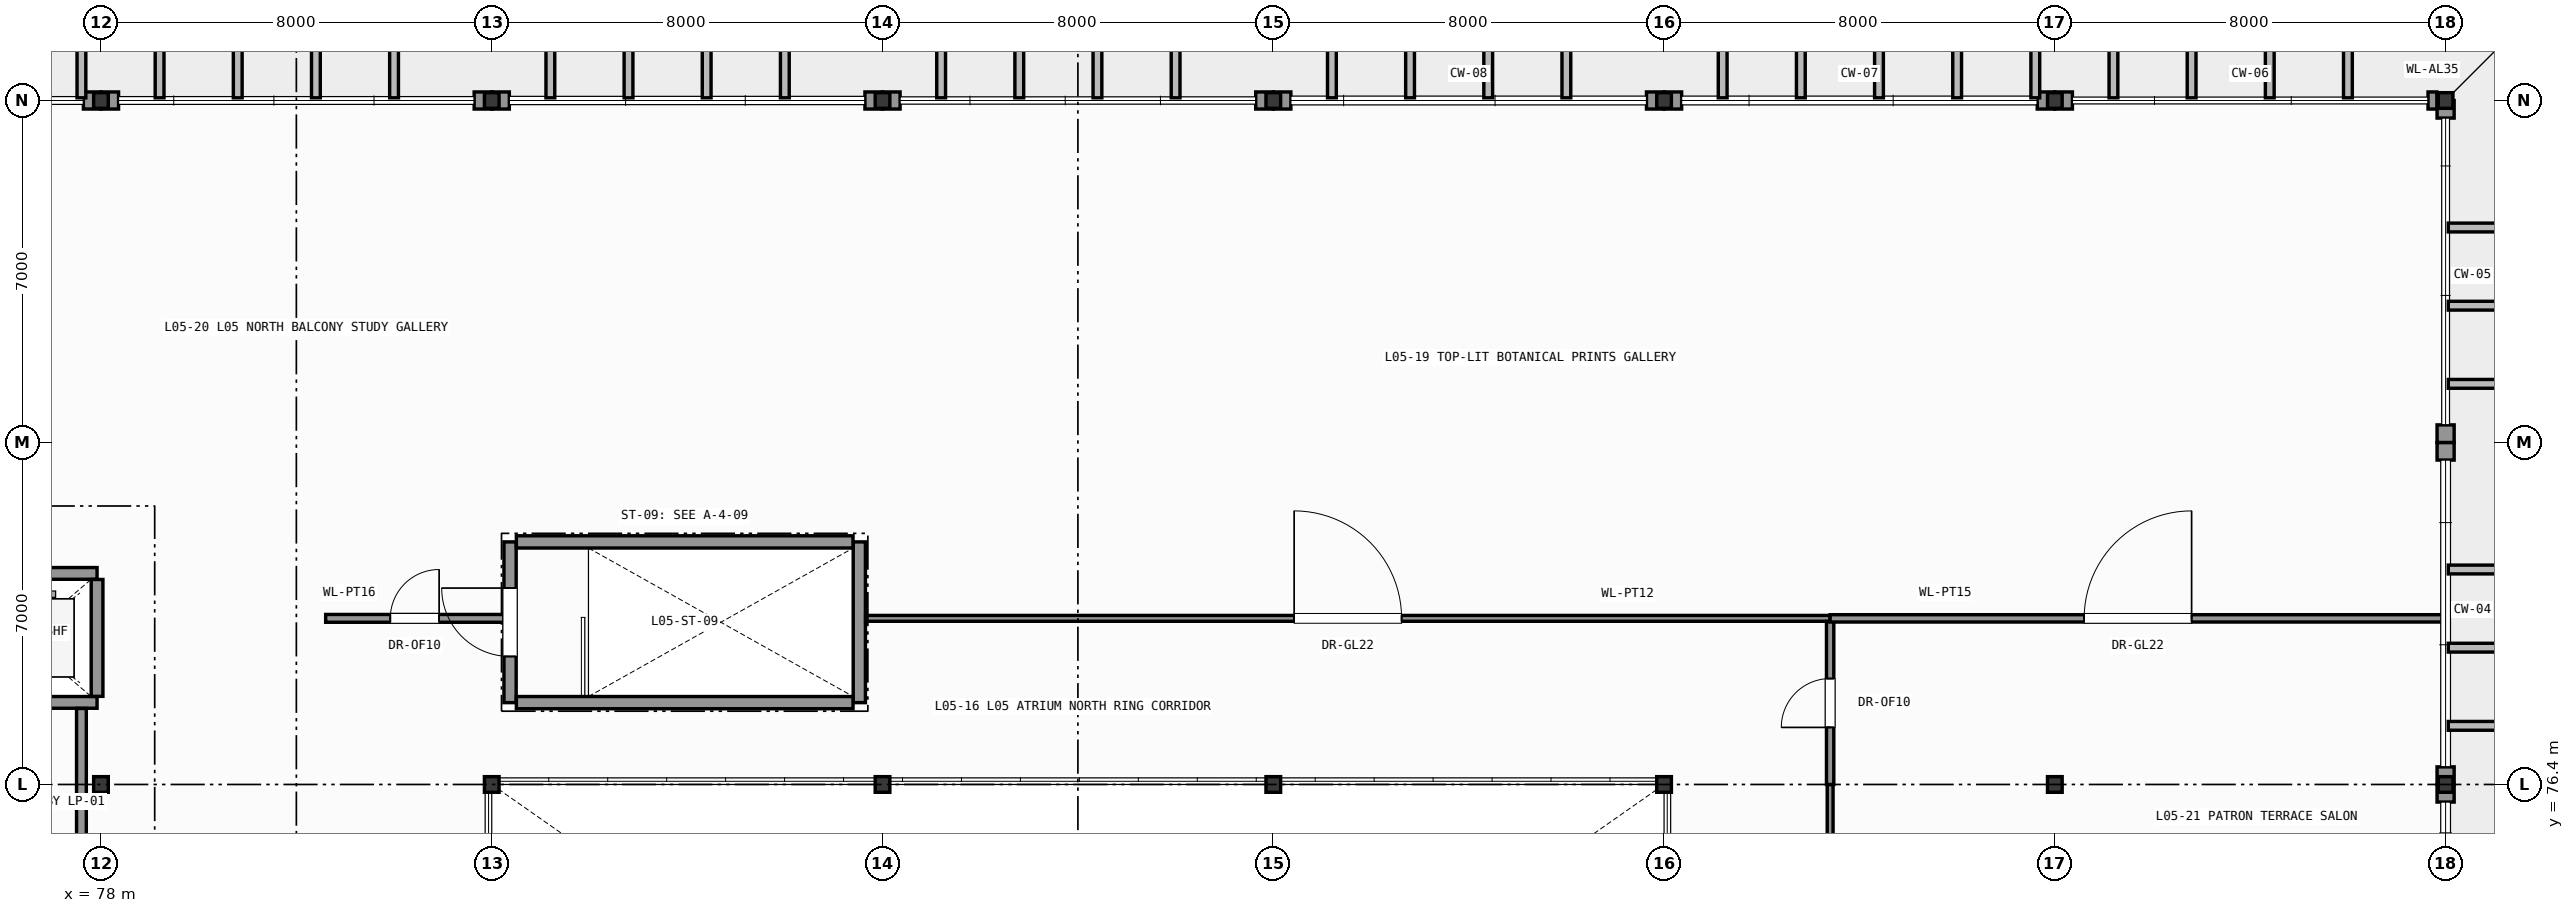
"""IFC4 building model, lengths in metres.
Left out: names, types, materials, properties, quantities, classifications, styles, units other than length and angle.
Written with IfcOpenShell. Run it as: python <this file> out.ifc"""

import sys

from ifc_helpers import new_model, si_unit, direction, frame, frame_2d, origin, origin_2d, place, context, subcontext, project, spatial, rectangle, i_section, extrude, element, fill, save


model = new_model("IFC4")
c1 = context("Model", 3, precision=1e-05, world=origin(), true_north=direction((0.0, 1.0)))
c2 = subcontext(c1, "Body", "Model", "MODEL_VIEW")
j1 = project(units=[si_unit("LENGTHUNIT", "METRE"), si_unit("PLANEANGLEUNIT", "RADIAN")], contexts=[c1])
p1 = place(None, origin())
s1 = spatial("IfcSite", under=j1, at=p1, CompositionType="ELEMENT")
p2 = place(p1, origin())
s2 = spatial("IfcBuilding", under=s1, at=p2, CompositionType="ELEMENT")
p3 = place(p2, frame((0.0, 0.0, 22.2)))
s3 = spatial("IfcBuildingStorey", under=s2, at=p3, CompositionType="ELEMENT", Elevation=22.2)
for number, where, z_axis, x_axis in (
    (1, (78.0, 76.4, 0.0), (0.0, 0.0, 1.0), (1.0, 0.0, 0.0)),
    (2, (78.0, 90.4, 0.0), (0.0, 0.0, 1.0), (1.0, 0.0, 0.0)),
    (3, (86.0, 76.4, 0.0), (0.0, 0.0, 1.0), (1.0, 0.0, 0.0)),
    (4, (86.0, 90.4, 0.0), (0.0, 0.0, 1.0), (1.0, 0.0, 0.0)),
    (5, (94.0, 76.4, 0.0), (0.0, 0.0, 1.0), (1.0, 0.0, 0.0)),
    (6, (94.0, 90.4, 0.0), (0.0, 0.0, 1.0), (1.0, 0.0, 0.0)),
    (7, (102.0, 76.4, 0.0), (0.0, 0.0, 1.0), (1.0, 0.0, 0.0)),
    (8, (102.0, 90.4, 0.0), (0.0, 0.0, 1.0), (1.0, 0.0, 0.0)),
    (9, (110.0, 76.4, 0.0), (0.0, 0.0, 1.0), (1.0, 0.0, 0.0)),
    (10, (110.0, 90.4, 0.0), (0.0, 0.0, 1.0), (1.0, 0.0, 0.0)),
    (11, (118.0, 76.4, 0.0), (0.0, 0.0, 1.0), (1.0, 0.0, 0.0)),
    (12, (118.0, 90.4, 0.0), (0.0, 0.0, 1.0), (1.0, 0.0, 0.0)),
    (13, (126.0, 76.4, 0.0), (0.0, 0.0, 1.0), (1.0, 0.0, 0.0)),
    (14, (126.0, 90.4, 0.0), (0.0, 0.0, 1.0), (1.0, 0.0, 0.0)),
):
    element("IfcColumn", number, at=place(p3, frame(where, z_axis=z_axis, x_axis=x_axis)), inside=s3, PredefinedType="COLUMN", context=c2, shape_type="SweptSolid", body=[
        extrude(i_section(OverallWidth=0.3, OverallDepth=0.32, WebThickness=0.011, FlangeThickness=0.021, FilletRadius=0.027, at=origin_2d()), origin(), (0.0, 0.0, 1.0), 4.2),
    ])
p4 = place(p3, frame((126.0, 76.04, 0.0), z_axis=(0.0, 0.0, 1.0), x_axis=(0.0, 1.0, 0.0)))
e15 = element("IfcWall", 15, at=p4, inside=s3, PredefinedType="SOLIDWALL", context=c2, shape_type="SweptSolid", body=[
    extrude(rectangle(XDim=0.36, YDim=0.35, at=frame_2d((0.18, 0.0))), origin(), (0.0, 0.0, 1.0), 3.98),
])
p5 = place(p3, frame((126.0, 76.4, 0.0), z_axis=(0.0, 0.0, 1.0), x_axis=(0.0, 1.0, 0.0)))
e16 = element("IfcWall", 16, at=p5, inside=s3, PredefinedType="SOLIDWALL", context=c2, shape_type="SweptSolid", body=[
    extrude(rectangle(XDim=0.36, YDim=0.35, at=frame_2d((0.18, 0.0))), origin(), (0.0, 0.0, 1.0), 3.98),
])
p6 = place(p3, frame((126.0, 83.04, 0.0), z_axis=(0.0, 0.0, 1.0), x_axis=(0.0, 1.0, 0.0)))
e17 = element("IfcWall", 17, at=p6, inside=s3, PredefinedType="SOLIDWALL", context=c2, shape_type="SweptSolid", body=[
    extrude(rectangle(XDim=0.36, YDim=0.35, at=frame_2d((0.18, 0.0))), origin(), (0.0, 0.0, 1.0), 3.98),
])
p7 = place(p3, frame((126.0, 83.4, 0.0), z_axis=(0.0, 0.0, 1.0), x_axis=(0.0, 1.0, 0.0)))
e18 = element("IfcWall", 18, at=p7, inside=s3, PredefinedType="SOLIDWALL", context=c2, shape_type="SweptSolid", body=[
    extrude(rectangle(XDim=0.36, YDim=0.35, at=frame_2d((0.18, 0.0))), origin(), (0.0, 0.0, 1.0), 3.98),
])
p8 = place(p3, frame((126.0, 90.04, 0.0), z_axis=(0.0, 0.0, 1.0), x_axis=(0.0, 1.0, 0.0)))
e19 = element("IfcWall", 19, at=p8, inside=s3, PredefinedType="SOLIDWALL", context=c2, shape_type="SweptSolid", body=[
    extrude(rectangle(XDim=0.36, YDim=0.35, at=frame_2d((0.18, 0.0))), origin(), (0.0, 0.0, 1.0), 3.98),
])
p9 = place(p3, frame((125.821, 90.4, 0.0), z_axis=(0.0, 0.0, 1.0), x_axis=(-1.0, 0.0, 0.0)))
e20 = element("IfcWall", 20, at=p9, inside=s3, PredefinedType="SOLIDWALL", context=c2, shape_type="SweptSolid", body=[
    extrude(rectangle(XDim=0.181, YDim=0.35, at=frame_2d((0.091, 0.0))), origin(), (0.0, 0.0, 1.0), 3.98),
])
for number, where, z_axis, x_axis in (
    (21, (118.36, 90.4, 0.0), (0.0, 0.0, 1.0), (-1.0, 0.0, 0.0)),
    (22, (118.0, 90.4, 0.0), (0.0, 0.0, 1.0), (-1.0, 0.0, 0.0)),
    (23, (110.36, 90.4, 0.0), (0.0, 0.0, 1.0), (-1.0, 0.0, 0.0)),
    (24, (110.0, 90.4, 0.0), (0.0, 0.0, 1.0), (-1.0, 0.0, 0.0)),
    (25, (102.36, 90.4, 0.0), (0.0, 0.0, 1.0), (-1.0, 0.0, 0.0)),
    (26, (102.0, 90.4, 0.0), (0.0, 0.0, 1.0), (-1.0, 0.0, 0.0)),
    (27, (94.36, 90.4, 0.0), (0.0, 0.0, 1.0), (-1.0, 0.0, 0.0)),
    (28, (94.0, 90.4, 0.0), (0.0, 0.0, 1.0), (-1.0, 0.0, 0.0)),
    (29, (86.36, 90.4, 0.0), (0.0, 0.0, 1.0), (-1.0, 0.0, 0.0)),
    (30, (86.0, 90.4, 0.0), (0.0, 0.0, 1.0), (-1.0, 0.0, 0.0)),
    (31, (78.36, 90.4, 0.0), (0.0, 0.0, 1.0), (-1.0, 0.0, 0.0)),
    (32, (78.0, 90.4, 0.0), (0.0, 0.0, 1.0), (-1.0, 0.0, 0.0)),
):
    element("IfcWall", number, at=place(p3, frame(where, z_axis=z_axis, x_axis=x_axis)), inside=s3, PredefinedType="SOLIDWALL", context=c2, shape_type="SweptSolid", body=[
        extrude(rectangle(XDim=0.36, YDim=0.35, at=frame_2d((0.18, 0.0))), origin(), (0.0, 0.0, 1.0), 3.335),
    ])
p10 = place(p3, frame((86.375, 78.075, 0.0), z_axis=(0.0, 0.0, 1.0), x_axis=(0.0, 1.0, 0.0)))
e33 = element("IfcWall", 33, at=p10, inside=s3, PredefinedType="SHEAR", context=c2, shape_type="SweptSolid", body=[
    extrude(rectangle(XDim=3.29, YDim=0.25, at=frame_2d((1.645, 0.0))), origin(), (0.0, 0.0, 1.0), 3.98),
])
p11 = place(p10, frame((0.945, 0.0, 0.0)))
e34 = element("IfcOpeningElement", 34, at=p11, cuts=e33, PredefinedType="OPENING", context=c2, shape_type="SweptSolid", body=[
    extrude(rectangle(XDim=1.4, YDim=2.2, at=frame_2d((0.7, 1.1))), frame((0.0, 0.135, 0.0), z_axis=(0.0, -1.0, 0.0), x_axis=(1.0, 0.0, 0.0)), (0.0, 0.0, 1.0), 0.27),
])
p12 = place(p3, frame((93.525, 78.075, 0.0), z_axis=(0.0, 0.0, 1.0), x_axis=(0.0, 1.0, 0.0)))
e35 = element("IfcWall", 35, at=p12, inside=s3, PredefinedType="SHEAR", context=c2, shape_type="SweptSolid", body=[
    extrude(rectangle(XDim=3.29, YDim=0.25, at=frame_2d((1.645, 0.0))), origin(), (0.0, 0.0, 1.0), 3.98),
])
for number, where, z_axis, x_axis in (
    (36, (86.504, 78.075, 0.0), (0.0, 0.0, 1.0), (1.0, 0.0, 0.0)),
    (37, (86.504, 81.365, 0.0), (0.0, 0.0, 1.0), (1.0, 0.0, 0.0)),
):
    element("IfcWall", number, at=place(p3, frame(where, z_axis=z_axis, x_axis=x_axis)), inside=s3, PredefinedType="SHEAR", context=c2, shape_type="SweptSolid", body=[
        extrude(rectangle(XDim=6.892, YDim=0.25, at=frame_2d((3.446, 0.0))), origin(), (0.0, 0.0, 1.0), 3.98),
    ])
p13 = place(p3, frame((74.88, 78.08, 0.0), z_axis=(0.0, 0.0, 1.0), x_axis=(1.0, 0.0, 0.0)))
e38 = element("IfcWall", 38, at=p13, inside=s3, PredefinedType="SHEAR", context=c2, shape_type="SweptSolid", body=[
    extrude(rectangle(XDim=3.04, YDim=0.24, at=frame_2d((1.52, 0.0))), origin(), (0.0, 0.0, 1.0), 3.98),
])
p14 = place(p13, frame((0.97, 0.0, 0.0)))
e39 = element("IfcOpeningElement", 39, at=p14, cuts=e38, PredefinedType="OPENING", context=c2, shape_type="SweptSolid", body=[
    extrude(rectangle(XDim=1.1, YDim=2.2, at=frame_2d((0.55, 1.1))), frame((0.0, 0.13, 0.0), z_axis=(0.0, -1.0, 0.0), x_axis=(1.0, 0.0, 0.0)), (0.0, 0.0, 1.0), 0.26),
])
p15 = place(p3, frame((74.88, 80.72, 0.0), z_axis=(0.0, 0.0, 1.0), x_axis=(1.0, 0.0, 0.0)))
e40 = element("IfcWall", 40, at=p15, inside=s3, PredefinedType="SHEAR", context=c2, shape_type="SweptSolid", body=[
    extrude(rectangle(XDim=3.04, YDim=0.24, at=frame_2d((1.52, 0.0))), origin(), (0.0, 0.0, 1.0), 3.98),
])
p16 = place(p3, frame((77.92, 78.204, 0.0), z_axis=(0.0, 0.0, 1.0), x_axis=(0.0, 1.0, 0.0)))
e41 = element("IfcWall", 41, at=p16, inside=s3, PredefinedType="SHEAR", context=c2, shape_type="SweptSolid", body=[
    extrude(rectangle(XDim=2.392, YDim=0.24, at=frame_2d((1.196, 0.0))), origin(), (0.0, 0.0, 1.0), 3.98),
])
p17 = place(p3, frame((77.6, 74.304, 0.0), z_axis=(0.0, 0.0, 1.0), x_axis=(0.0, 1.0, 0.0)))
e42 = element("IfcWall", 42, at=p17, inside=s3, PredefinedType="PARTITIONING", context=c2, shape_type="SweptSolid", body=[
    extrude(rectangle(XDim=3.652, YDim=0.2, at=frame_2d((1.826, 0.0))), origin(), (0.0, 0.0, 1.0), 3.98),
])
p18 = place(p3, frame((113.4, 71.6, 0.0), z_axis=(0.0, 0.0, 1.0), x_axis=(0.0, 1.0, 0.0)))
e43 = element("IfcWall", 43, at=p18, inside=s3, PredefinedType="PARTITIONING", context=c2, shape_type="SweptSolid", body=[
    extrude(rectangle(XDim=4.8, YDim=0.12, at=frame_2d((2.4, 0.0))), origin(), (0.0, 0.0, 1.0), 3.98),
])
p19 = place(p18, frame((1.5, 0.0, 0.0)))
e44 = element("IfcOpeningElement", 44, at=p19, cuts=e43, PredefinedType="OPENING", context=c2, shape_type="SweptSolid", body=[
    extrude(rectangle(XDim=1.8, YDim=2.4, at=frame_2d((0.9, 1.2))), frame((0.0, 0.07, 0.0), z_axis=(0.0, -1.0, 0.0), x_axis=(1.0, 0.0, 0.0)), (0.0, 0.0, 1.0), 0.14),
])
p20 = place(p3, frame((93.654, 79.8, 0.0), z_axis=(0.0, 0.0, 1.0), x_axis=(1.0, 0.0, 0.0)))
e45 = element("IfcWall", 45, at=p20, inside=s3, PredefinedType="PARTITIONING", context=c2, shape_type="SweptSolid", body=[
    extrude(rectangle(XDim=19.746, YDim=0.12, at=frame_2d((9.873, 0.0))), origin(), (0.0, 0.0, 1.0), 3.98),
])
p21 = place(p20, frame((8.773, 0.0, 0.0)))
e46 = element("IfcOpeningElement", 46, at=p21, cuts=e45, PredefinedType="OPENING", context=c2, shape_type="SweptSolid", body=[
    extrude(rectangle(XDim=2.2, YDim=2.6, at=frame_2d((1.1, 1.3))), frame((0.0, 0.07, 0.0), z_axis=(0.0, -1.0, 0.0), x_axis=(1.0, 0.0, 0.0)), (0.0, 0.0, 1.0), 0.14),
])
p22 = place(p3, frame((82.6, 79.8, 0.0), z_axis=(0.0, 0.0, 1.0), x_axis=(1.0, 0.0, 0.0)))
e47 = element("IfcWall", 47, at=p22, inside=s3, PredefinedType="PARTITIONING", context=c2, shape_type="SweptSolid", body=[
    extrude(rectangle(XDim=3.646, YDim=0.16, at=frame_2d((1.823, 0.0))), origin(), (0.0, 0.0, 1.0), 3.98),
])
p23 = place(p22, frame((1.323, 0.0, 0.0)))
e48 = element("IfcOpeningElement", 48, at=p23, cuts=e47, PredefinedType="OPENING", context=c2, shape_type="SweptSolid", body=[
    extrude(rectangle(XDim=1.0, YDim=2.15, at=frame_2d((0.5, 1.075))), frame((0.0, 0.09, 0.0), z_axis=(0.0, -1.0, 0.0), x_axis=(1.0, 0.0, 0.0)), (0.0, 0.0, 1.0), 0.18),
])
p24 = place(p3, frame((113.4, 76.4, 0.0), z_axis=(0.0, 0.0, 1.0), x_axis=(0.0, 1.0, 0.0)))
e49 = element("IfcWall", 49, at=p24, inside=s3, PredefinedType="PARTITIONING", context=c2, shape_type="SweptSolid", body=[
    extrude(rectangle(XDim=3.336, YDim=0.15, at=frame_2d((1.668, 0.0))), origin(), (0.0, 0.0, 1.0), 3.98),
])
p25 = place(p24, frame((1.168, 0.0, 0.0)))
e50 = element("IfcOpeningElement", 50, at=p25, cuts=e49, PredefinedType="OPENING", context=c2, shape_type="SweptSolid", body=[
    extrude(rectangle(XDim=1.0, YDim=2.15, at=frame_2d((0.5, 1.075))), frame((0.0, 0.085, 0.0), z_axis=(0.0, -1.0, 0.0), x_axis=(1.0, 0.0, 0.0)), (0.0, 0.0, 1.0), 0.17),
])
p26 = place(p3, frame((113.4, 79.8, 0.0), z_axis=(0.0, 0.0, 1.0), x_axis=(1.0, 0.0, 0.0)))
e51 = element("IfcWall", 51, at=p26, inside=s3, PredefinedType="PARTITIONING", context=c2, shape_type="SweptSolid", body=[
    extrude(rectangle(XDim=12.6, YDim=0.15, at=frame_2d((6.3, 0.0))), origin(), (0.0, 0.0, 1.0), 3.98),
])
p27 = place(p26, frame((5.2, 0.0, 0.0)))
e52 = element("IfcOpeningElement", 52, at=p27, cuts=e51, PredefinedType="OPENING", context=c2, shape_type="SweptSolid", body=[
    extrude(rectangle(XDim=2.2, YDim=2.6, at=frame_2d((1.1, 1.3))), frame((0.0, 0.085, 0.0), z_axis=(0.0, -1.0, 0.0), x_axis=(1.0, 0.0, 0.0)), (0.0, 0.0, 1.0), 0.17),
])
p28 = place(p11, origin())
e53 = element("IfcDoor", 53, at=p28, inside=s3, OperationType="SINGLE_SWING_RIGHT", PredefinedType="DOOR", context=c2, shape_type="SweptSolid", body=[
    extrude(rectangle(XDim=1.4, YDim=2.2, at=frame_2d((0.7, 1.1))), frame((0.0, 0.025, 0.0), z_axis=(0.0, -1.0, 0.0), x_axis=(1.0, 0.0, 0.0)), (0.0, 0.0, 1.0), 0.05),
])
fill(e34, e53)
p29 = place(p21, origin())
e54 = element("IfcDoor", 54, at=p29, inside=s3, OperationType="SINGLE_SWING_LEFT", PredefinedType="DOOR", context=c2, shape_type="SweptSolid", body=[
    extrude(rectangle(XDim=2.2, YDim=2.6, at=frame_2d((1.1, 1.3))), frame((0.0, 0.025, 0.0), z_axis=(0.0, -1.0, 0.0), x_axis=(1.0, 0.0, 0.0)), (0.0, 0.0, 1.0), 0.05),
])
fill(e46, e54)
p30 = place(p23, origin())
e55 = element("IfcDoor", 55, at=p30, inside=s3, OperationType="SINGLE_SWING_RIGHT", PredefinedType="DOOR", context=c2, shape_type="SweptSolid", body=[
    extrude(rectangle(XDim=1.0, YDim=2.15, at=frame_2d((0.5, 1.075))), frame((0.0, 0.025, 0.0), z_axis=(0.0, -1.0, 0.0), x_axis=(1.0, 0.0, 0.0)), (0.0, 0.0, 1.0), 0.05),
])
fill(e48, e55)
p31 = place(p25, origin())
e56 = element("IfcDoor", 56, at=p31, inside=s3, OperationType="SINGLE_SWING_LEFT", PredefinedType="DOOR", context=c2, shape_type="SweptSolid", body=[
    extrude(rectangle(XDim=1.0, YDim=2.15, at=frame_2d((0.5, 1.075))), frame((0.0, 0.025, 0.0), z_axis=(0.0, -1.0, 0.0), x_axis=(1.0, 0.0, 0.0)), (0.0, 0.0, 1.0), 0.05),
])
fill(e50, e56)
p32 = place(p27, origin())
e57 = element("IfcDoor", 57, at=p32, inside=s3, OperationType="SINGLE_SWING_RIGHT", PredefinedType="DOOR", context=c2, shape_type="SweptSolid", body=[
    extrude(rectangle(XDim=2.2, YDim=2.6, at=frame_2d((1.1, 1.3))), frame((0.0, 0.025, 0.0), z_axis=(0.0, -1.0, 0.0), x_axis=(1.0, 0.0, 0.0)), (0.0, 0.0, 1.0), 0.05),
])
fill(e52, e57)
save(model, sys.argv[1])
